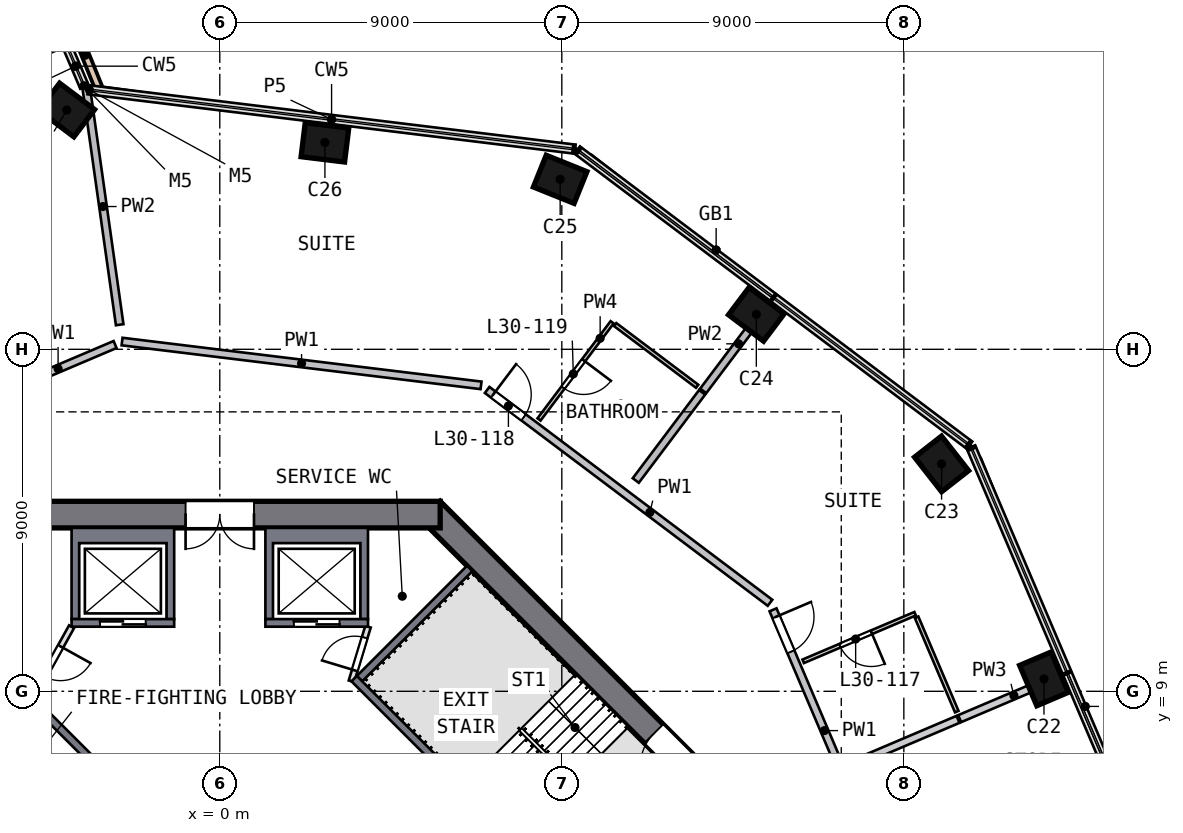
"""IFC4 building model, lengths in metres.
Left out: names, types, materials, properties, quantities, classifications, styles, units other than length and angle.
Written with IfcOpenShell. Run it as: python <this file> out.ifc"""

import sys

from ifc_helpers import new_model, si_unit, direction, frame, frame_2d, origin, origin_2d, place, context, subcontext, project, spatial, polyline, rectangle, outline, extrude, element, fill, save


model = new_model("IFC4")
c1 = context("Model", 3, precision=1e-05, world=origin(), true_north=direction((0.0, 1.0)))
c2 = subcontext(c1, "Body", "Model", "MODEL_VIEW")
j1 = project(units=[si_unit("LENGTHUNIT", "METRE"), si_unit("PLANEANGLEUNIT", "RADIAN")], contexts=[c1])
p1 = place(None, origin())
s1 = spatial("IfcSite", under=j1, at=p1, CompositionType="ELEMENT")
p2 = place(p1, origin())
s2 = spatial("IfcBuilding", under=s1, at=p2, CompositionType="ELEMENT")
p3 = place(p2, frame((0.0, 0.0, 128.0)))
s3 = spatial("IfcBuildingStorey", under=s2, at=p3, CompositionType="ELEMENT", Elevation=128.0)
p4 = place(p3, frame((21.725, 9.24, 0.0), z_axis=(-0.031447894, 0.07228864, 0.996887849), x_axis=(-0.389957088, 0.91745261, -0.078830061)))
e1 = element("IfcColumn", 1, at=p4, inside=s3, PredefinedType="COLUMN", context=c2, shape_type="SweptSolid", body=[
    extrude(rectangle(XDim=1.15, YDim=0.9, at=origin_2d()), origin(), (0.0, 0.0, 1.0), 4.705),
])
p5 = place(p3, frame((19.054, 14.908, 0.0), z_axis=(-0.050329312, 0.063248898, 0.996727915), x_axis=(0.614021089, -0.785140179, 0.080826983)))
e2 = element("IfcColumn", 2, at=p5, inside=s3, PredefinedType="COLUMN", context=c2, shape_type="SweptSolid", body=[
    extrude(rectangle(XDim=1.15, YDim=0.9, at=origin_2d()), origin(), (0.0, 0.0, 1.0), 4.705),
])
p6 = place(p3, frame((14.195, 18.865, 0.0), z_axis=(-0.063414643, 0.046860412, 0.996886495), x_axis=(-0.796717911, 0.599185859, -0.078847169)))
e3 = element("IfcColumn", 3, at=p6, inside=s3, PredefinedType="COLUMN", context=c2, shape_type="SweptSolid", body=[
    extrude(rectangle(XDim=1.15, YDim=0.9, at=origin_2d()), origin(), (0.0, 0.0, 1.0), 4.705),
])
p7 = place(p3, frame((9.047, 22.438, 0.0), z_axis=(-0.075182891, 0.02957505, 0.996731082), x_axis=(0.924435727, -0.372682031, 0.08078793)))
e4 = element("IfcColumn", 4, at=p7, inside=s3, PredefinedType="COLUMN", context=c2, shape_type="SweptSolid", body=[
    extrude(rectangle(XDim=1.15, YDim=0.9, at=origin_2d()), origin(), (0.0, 0.0, 1.0), 4.705),
])
p8 = place(p3, frame((2.861, 23.434, 0.0), z_axis=(-0.078360052, 0.008925781, 0.996885165), x_axis=(-0.989494135, 0.121168594, -0.078863985)))
e5 = element("IfcColumn", 5, at=p8, inside=s3, PredefinedType="COLUMN", context=c2, shape_type="SweptSolid", body=[
    extrude(rectangle(XDim=1.15, YDim=0.9, at=origin_2d()), origin(), (0.0, 0.0, 1.0), 4.705),
])
p9 = place(p3, frame((-3.929, 24.314, 0.0), z_axis=(-0.081088163, -0.013800033, 0.996611393), x_axis=(0.795731126, -0.603018835, 0.056393792)))
e6 = element("IfcColumn", 6, at=p9, inside=s3, PredefinedType="COLUMN", context=c2, shape_type="SweptSolid", body=[
    extrude(rectangle(XDim=1.15, YDim=0.9, at=origin_2d()), origin(), (0.0, 0.0, 1.0), 4.706),
])
p10 = place(p3, frame((13.752, 5.552, 0.0), z_axis=(0.0, 0.0, 1.0), x_axis=(-0.707106781, 0.707106781, 0.0)))
e7 = element("IfcWall", 7, at=p10, inside=s3, PredefinedType="SHEAR", context=c2, shape_type="SweptSolid", body=[
    extrude(rectangle(XDim=11.598, YDim=0.7, at=frame_2d((5.799, 0.0))), origin(), (0.0, 0.0, 1.0), 5.0),
])
p11 = place(p10, frame((2.099, 0.0, 0.0)))
e8 = element("IfcOpeningElement", 8, at=p11, cuts=e7, PredefinedType="OPENING", context=c2, shape_type="SweptSolid", body=[
    extrude(rectangle(XDim=1.2, YDim=2.1, at=frame_2d((0.6, 1.05))), frame((0.0, 0.36, 0.0), z_axis=(0.0, -1.0, 0.0), x_axis=(1.0, 0.0, 0.0)), (0.0, 0.0, 1.0), 0.72),
])
p12 = place(p3, frame((5.799, 13.65, 0.0), z_axis=(0.0, 0.0, 1.0), x_axis=(-1.0, 0.0, 0.0)))
e9 = element("IfcWall", 9, at=p12, inside=s3, PredefinedType="SHEAR", context=c2, shape_type="SweptSolid", body=[
    extrude(rectangle(XDim=11.598, YDim=0.7, at=frame_2d((5.799, 0.0))), origin(), (0.0, 0.0, 1.0), 5.0),
])
p13 = place(p12, frame((4.899, 0.0, 0.0)))
e10 = element("IfcOpeningElement", 10, at=p13, cuts=e9, PredefinedType="OPENING", context=c2, shape_type="SweptSolid", body=[
    extrude(rectangle(XDim=1.8, YDim=2.1, at=frame_2d((0.9, 1.05))), frame((0.0, 0.36, 0.0), z_axis=(0.0, -1.0, 0.0), x_axis=(1.0, 0.0, 0.0)), (0.0, 0.0, 1.0), 0.72),
])
p14 = place(p3, frame((-4.028, 26.079, 0.0), z_axis=(0.0, 0.0, 1.0), x_axis=(-0.920232466, -0.391372212, 0.0)))
e11 = element("IfcWall", 11, at=p14, inside=s3, PredefinedType="SOLIDWALL", context=c2, shape_type="SweptSolid", body=[
    extrude(rectangle(XDim=1.875, YDim=0.15, at=frame_2d((0.938, 0.0))), origin(), (0.0, 0.0, 1.0), 4.69),
])
p15 = place(p3, frame((-3.169, 24.839, 0.0), z_axis=(0.0, 0.0, 1.0), x_axis=(-0.375976177, 0.926629329, 0.0)))
e12 = element("IfcWall", 12, at=p15, inside=s3, PredefinedType="PARAPET", context=c2, shape_type="SweptSolid", body=[
    extrude(rectangle(XDim=1.944, YDim=0.2, at=frame_2d((0.972, 0.0))), origin(), (0.0, 0.0, 1.0), 1.1),
])
p16 = place(p3, frame((-3.955, 26.51, 0.0), z_axis=(0.0, 0.0, 1.0), x_axis=(-0.926634415, -0.375963642, 0.0)))
e13 = element("IfcWall", 13, at=p16, inside=s3, PredefinedType="PARAPET", context=c2, shape_type="SweptSolid", body=[
    extrude(rectangle(XDim=1.6, YDim=0.2, at=frame_2d((0.8, 0.0))), origin(), (0.0, 0.0, 1.0), 1.1),
])
p17 = place(p3, origin())
e14 = element("IfcWall", 14, at=p17, inside=s3, PredefinedType="SOLIDWALL", context=c2, shape_type="SweptSolid", body=[
    extrude(outline(polyline([(3.9, 13.3), (3.9, 10.9), (3.7, 10.9), (3.7, 12.9), (1.4, 12.9), (1.4, 10.9), (1.2, 10.9), (1.2, 13.3), (3.9, 13.3)])), origin(), (0.0, 0.0, 1.0), 4.69),
])
p18 = place(p3, frame((1.2, 10.8, 0.0), z_axis=(0.0, 0.0, 1.0), x_axis=(1.0, 0.0, 0.0)))
e15 = element("IfcWall", 15, at=p18, inside=s3, PredefinedType="SOLIDWALL", context=c2, shape_type="SweptSolid", body=[
    extrude(rectangle(XDim=2.7, YDim=0.2, at=frame_2d((1.35, 0.0))), origin(), (0.0, 0.0, 1.0), 4.69),
])
p19 = place(p18, frame((0.75, 0.0, 0.0)))
e16 = element("IfcOpeningElement", 16, at=p19, cuts=e15, PredefinedType="OPENING", context=c2, shape_type="SweptSolid", body=[
    extrude(rectangle(XDim=1.2, YDim=2.1, at=frame_2d((0.6, 1.05))), frame((0.0, 0.11, 0.0), z_axis=(0.0, -1.0, 0.0), x_axis=(1.0, 0.0, 0.0)), (0.0, 0.0, 1.0), 0.22),
])
p20 = place(p3, origin())
e17 = element("IfcWall", 17, at=p20, inside=s3, PredefinedType="SOLIDWALL", context=c2, shape_type="SweptSolid", body=[
    extrude(outline(polyline([(-3.9, 10.9), (-3.9, 13.3), (-1.2, 13.3), (-1.2, 10.9), (-1.4, 10.9), (-1.4, 12.9), (-3.7, 12.9), (-3.7, 10.9), (-3.9, 10.9)])), origin(), (0.0, 0.0, 1.0), 4.69),
])
p21 = place(p3, frame((-1.2, 10.8, 0.0), z_axis=(0.0, 0.0, 1.0), x_axis=(-1.0, 0.0, 0.0)))
e18 = element("IfcWall", 18, at=p21, inside=s3, PredefinedType="SOLIDWALL", context=c2, shape_type="SweptSolid", body=[
    extrude(rectangle(XDim=2.7, YDim=0.2, at=frame_2d((1.35, 0.0))), origin(), (0.0, 0.0, 1.0), 4.69),
])
p22 = place(p21, frame((0.75, 0.0, 0.0)))
e19 = element("IfcOpeningElement", 19, at=p22, cuts=e18, PredefinedType="OPENING", context=c2, shape_type="SweptSolid", body=[
    extrude(rectangle(XDim=1.2, YDim=2.1, at=frame_2d((0.6, 1.05))), frame((0.0, 0.11, 0.0), z_axis=(0.0, -1.0, 0.0), x_axis=(1.0, 0.0, 0.0)), (0.0, 0.0, 1.0), 0.22),
])
p23 = place(p3, frame((3.535, 9.334, 0.0), z_axis=(0.0, 0.0, 1.0), x_axis=(0.707106781, -0.707106781, 0.0)))
e20 = element("IfcWall", 20, at=p23, inside=s3, PredefinedType="SOLIDWALL", context=c2, shape_type="SweptSolid", body=[
    extrude(rectangle(XDim=8.2, YDim=0.2, at=frame_2d((4.1, 0.0))), origin(), (0.0, 0.0, 1.0), 4.69),
])
p24 = place(p23, frame((6.6, 0.0, 0.0)))
e21 = element("IfcOpeningElement", 21, at=p24, cuts=e20, PredefinedType="OPENING", context=c2, shape_type="SweptSolid", body=[
    extrude(rectangle(XDim=1.2, YDim=2.1, at=frame_2d((0.6, 1.05))), frame((0.0, 0.11, 0.0), z_axis=(0.0, -1.0, 0.0), x_axis=(1.0, 0.0, 0.0)), (0.0, 0.0, 1.0), 0.22),
])
p25 = place(p3, frame((3.677, 9.334, 0.0), z_axis=(0.0, 0.0, 1.0), x_axis=(0.707106781, 0.707106781, 0.0)))
e22 = element("IfcWall", 22, at=p25, inside=s3, PredefinedType="SOLIDWALL", context=c2, shape_type="SweptSolid", body=[
    extrude(rectangle(XDim=4.1, YDim=0.2, at=frame_2d((2.05, 0.0))), origin(), (0.0, 0.0, 1.0), 4.69),
])
p26 = place(p3, frame((-3.005, 6.823, 0.0), z_axis=(0.0, 0.0, 1.0), x_axis=(-0.707106781, 0.707106781, 0.0)))
e23 = element("IfcWall", 23, at=p26, inside=s3, PredefinedType="SOLIDWALL", context=c2, shape_type="SweptSolid", body=[
    extrude(rectangle(XDim=2.8, YDim=0.2, at=frame_2d((1.4, 0.0))), origin(), (0.0, 0.0, 1.0), 4.69),
])
p27 = place(p3, frame((3.465, 9.263, 0.0), z_axis=(0.0, 0.0, 1.0), x_axis=(0.289808785, 0.957084567, 0.0)))
e24 = element("IfcWall", 24, at=p27, inside=s3, PredefinedType="PARTITIONING", context=c2, shape_type="SweptSolid", body=[
    extrude(rectangle(XDim=1.501, YDim=0.15, at=frame_2d((0.75, 0.0))), origin(), (0.0, 0.0, 1.0), 4.69),
])
p28 = place(p27, frame((0.301, 0.0, 0.0)))
e25 = element("IfcOpeningElement", 25, at=p28, cuts=e24, PredefinedType="OPENING", context=c2, shape_type="SweptSolid", body=[
    extrude(rectangle(XDim=0.9, YDim=2.1, at=frame_2d((0.45, 1.05))), frame((0.0, 0.085, 0.0), z_axis=(0.0, -1.0, 0.0), x_axis=(1.0, 0.0, 0.0)), (0.0, 0.0, 1.0), 0.17),
])
p29 = place(p3, frame((-3.9, 10.7, 0.0), z_axis=(0.0, 0.0, 1.0), x_axis=(-0.485692555, -0.874129705, 0.0)))
e26 = element("IfcWall", 26, at=p29, inside=s3, PredefinedType="PARTITIONING", context=c2, shape_type="SweptSolid", body=[
    extrude(rectangle(XDim=2.089, YDim=0.15, at=frame_2d((1.044, 0.0))), origin(), (0.0, 0.0, 1.0), 4.69),
])
p30 = place(p29, frame((0.594, 0.0, 0.0)))
e27 = element("IfcOpeningElement", 27, at=p30, cuts=e26, PredefinedType="OPENING", context=c2, shape_type="SweptSolid", body=[
    extrude(rectangle(XDim=0.9, YDim=2.1, at=frame_2d((0.45, 1.05))), frame((0.0, 0.085, 0.0), z_axis=(0.0, -1.0, 0.0), x_axis=(1.0, 0.0, 0.0)), (0.0, 0.0, 1.0), 0.17),
])
p31 = place(p3, frame((-2.756, 18.126, 0.0), z_axis=(0.0, 0.0, 1.0), x_axis=(-0.920234459, -0.391367525, 0.0)))
e28 = element("IfcWall", 28, at=p31, inside=s3, PredefinedType="SOLIDWALL", context=c2, shape_type="SweptSolid", body=[
    extrude(rectangle(XDim=3.258, YDim=0.2, at=frame_2d((1.629, 0.0))), origin(), (0.0, 0.0, 1.0), 4.69),
])
p32 = place(p3, frame((6.875, 17.051, 0.0), z_axis=(0.0, 0.0, 1.0), x_axis=(-0.992628272, 0.121198655, 0.0)))
e29 = element("IfcWall", 29, at=p32, inside=s3, PredefinedType="SOLIDWALL", context=c2, shape_type="SweptSolid", body=[
    extrude(rectangle(XDim=9.516, YDim=0.2, at=frame_2d((4.758, 0.0))), origin(), (0.0, 0.0, 1.0), 4.69),
])
p33 = place(p3, frame((7.035, 16.93, 0.0), z_axis=(0.0, 0.0, 1.0), x_axis=(0.799039784, -0.601278158, 0.0)))
e30 = element("IfcWall", 30, at=p33, inside=s3, PredefinedType="SOLIDWALL", context=c2, shape_type="SweptSolid", body=[
    extrude(rectangle(XDim=9.316, YDim=0.2, at=frame_2d((4.658, 0.0))), origin(), (0.0, 0.0, 1.0), 4.69),
])
p34 = place(p33, frame((0.2, 0.0, 0.0)))
e31 = element("IfcOpeningElement", 31, at=p34, cuts=e30, PredefinedType="OPENING", context=c2, shape_type="SweptSolid", body=[
    extrude(rectangle(XDim=1.0, YDim=2.1, at=frame_2d((0.5, 1.05))), frame((0.0, 0.11, 0.0), z_axis=(0.0, -1.0, 0.0), x_axis=(1.0, 0.0, 0.0)), (0.0, 0.0, 1.0), 0.22),
])
p35 = place(p3, frame((14.558, 11.144, 0.0), z_axis=(0.0, 0.0, 1.0), x_axis=(0.39135783, -0.920238582, 0.0)))
e32 = element("IfcWall", 32, at=p35, inside=s3, PredefinedType="SOLIDWALL", context=c2, shape_type="SweptSolid", body=[
    extrude(rectangle(XDim=9.116, YDim=0.2, at=frame_2d((4.558, 0.0))), origin(), (0.0, 0.0, 1.0), 4.69),
])
p36 = place(p35, frame((0.2, 0.0, 0.0)))
e33 = element("IfcOpeningElement", 33, at=p36, cuts=e32, PredefinedType="OPENING", context=c2, shape_type="SweptSolid", body=[
    extrude(rectangle(XDim=1.0, YDim=2.1, at=frame_2d((0.5, 1.05))), frame((0.0, 0.11, 0.0), z_axis=(0.0, -1.0, 0.0), x_axis=(1.0, 0.0, 0.0)), (0.0, 0.0, 1.0), 0.22),
])
p37 = place(p35, frame((8.008, 0.0, 0.0)))
e34 = element("IfcOpeningElement", 34, at=p37, cuts=e32, PredefinedType="OPENING", context=c2, shape_type="SweptSolid", body=[
    extrude(rectangle(XDim=0.9, YDim=2.1, at=frame_2d((0.45, 1.05))), frame((0.0, 0.11, 0.0), z_axis=(0.0, -1.0, 0.0), x_axis=(1.0, 0.0, 0.0)), (0.0, 0.0, 1.0), 0.22),
])
p38 = place(p35, frame((5.708, 0.0, 0.0)))
e35 = element("IfcOpeningElement", 35, at=p38, cuts=e32, PredefinedType="OPENING", context=c2, shape_type="SweptSolid", body=[
    extrude(rectangle(XDim=0.9, YDim=2.1, at=frame_2d((0.45, 1.05))), frame((0.0, 0.11, 0.0), z_axis=(0.0, -1.0, 0.0), x_axis=(1.0, 0.0, 0.0)), (0.0, 0.0, 1.0), 0.22),
])
p39 = place(p3, frame((-3.513, 24.867, 0.0), z_axis=(0.0, 0.0, 1.0), x_axis=(0.139908623, -0.990164419, 0.0)))
e36 = element("IfcWall", 36, at=p39, inside=s3, PredefinedType="SOLIDWALL", context=c2, shape_type="SweptSolid", body=[
    extrude(rectangle(XDim=6.282, YDim=0.2, at=frame_2d((3.141, 0.0))), origin(), (0.0, 0.0, 1.0), 4.69),
])
p40 = place(p3, frame((10.946, 14.547, 0.0), z_axis=(0.0, 0.0, 1.0), x_axis=(0.601223093, 0.799081217, 0.0)))
e37 = element("IfcWall", 37, at=p40, inside=s3, PredefinedType="SOLIDWALL", context=c2, shape_type="SweptSolid", body=[
    extrude(rectangle(XDim=2.905, YDim=0.2, at=frame_2d((1.452, 0.0))), origin(), (0.0, 0.0, 1.0), 4.69),
])
p41 = place(p3, frame((12.72, 16.905, 0.0), z_axis=(0.0, 0.0, 1.0), x_axis=(0.601220789, 0.799082951, 0.0)))
e38 = element("IfcWall", 38, at=p41, inside=s3, PredefinedType="SOLIDWALL", context=c2, shape_type="SweptSolid", body=[
    extrude(rectangle(XDim=3.102, YDim=0.2, at=frame_2d((1.551, 0.0))), origin(), (0.0, 0.0, 1.0), 4.69),
])
p42 = place(p3, frame((10.324, 18.71, 0.0), z_axis=(0.0, 0.0, 1.0), x_axis=(-0.601280986, -0.799037656, 0.0)))
e39 = element("IfcWall", 39, at=p42, inside=s3, PredefinedType="PARTITIONING", context=c2, shape_type="SweptSolid", body=[
    extrude(rectangle(XDim=3.2, YDim=0.1, at=frame_2d((1.6, 0.0))), origin(), (0.0, 0.0, 1.0), 4.69),
])
p43 = place(p42, frame((1.25, 0.0, 0.0)))
e40 = element("IfcOpeningElement", 40, at=p43, cuts=e39, PredefinedType="OPENING", context=c2, shape_type="SweptSolid", body=[
    extrude(rectangle(XDim=0.9, YDim=2.1, at=frame_2d((0.45, 1.05))), frame((0.0, 0.06, 0.0), z_axis=(0.0, -1.0, 0.0), x_axis=(1.0, 0.0, 0.0)), (0.0, 0.0, 1.0), 0.12),
])
p44 = place(p3, frame((10.404, 18.65, 0.0), z_axis=(0.0, 0.0, 1.0), x_axis=(0.799033288, -0.60128679, 0.0)))
e41 = element("IfcWall", 41, at=p44, inside=s3, PredefinedType="PARTITIONING", context=c2, shape_type="SweptSolid", body=[
    extrude(rectangle(XDim=2.7, YDim=0.1, at=frame_2d((1.35, 0.0))), origin(), (0.0, 0.0, 1.0), 4.69),
])
p45 = place(p3, frame((18.296, 11.042, 0.0), z_axis=(0.0, 0.0, 1.0), x_axis=(-0.92021896, -0.391403968, 0.0)))
e42 = element("IfcWall", 42, at=p45, inside=s3, PredefinedType="PARTITIONING", context=c2, shape_type="SweptSolid", body=[
    extrude(rectangle(XDim=3.2, YDim=0.1, at=frame_2d((1.6, 0.0))), origin(), (0.0, 0.0, 1.0), 4.69),
])
p46 = place(p45, frame((1.25, 0.0, 0.0)))
e43 = element("IfcOpeningElement", 43, at=p46, cuts=e42, PredefinedType="OPENING", context=c2, shape_type="SweptSolid", body=[
    extrude(rectangle(XDim=0.9, YDim=2.1, at=frame_2d((0.45, 1.05))), frame((0.0, 0.06, 0.0), z_axis=(0.0, -1.0, 0.0), x_axis=(1.0, 0.0, 0.0)), (0.0, 0.0, 1.0), 0.12),
])
p47 = place(p3, frame((18.336, 10.949, 0.0), z_axis=(0.0, 0.0, 1.0), x_axis=(0.391353166, -0.920240566, 0.0)))
e44 = element("IfcWall", 44, at=p47, inside=s3, PredefinedType="PARTITIONING", context=c2, shape_type="SweptSolid", body=[
    extrude(rectangle(XDim=2.7, YDim=0.1, at=frame_2d((1.35, 0.0))), origin(), (0.0, 0.0, 1.0), 4.69),
])
p48 = place(p3, frame((16.753, 7.125, 0.0), z_axis=(0.0, 0.0, 1.0), x_axis=(0.920249965, 0.391331065, 0.0)))
e45 = element("IfcWall", 45, at=p48, inside=s3, PredefinedType="SOLIDWALL", context=c2, shape_type="SweptSolid", body=[
    extrude(rectangle(XDim=2.905, YDim=0.2, at=frame_2d((1.452, 0.0))), origin(), (0.0, 0.0, 1.0), 4.69),
])
p49 = place(p3, frame((19.469, 8.28, 0.0), z_axis=(0.0, 0.0, 1.0), x_axis=(0.920220386, 0.391400614, 0.0)))
e46 = element("IfcWall", 46, at=p49, inside=s3, PredefinedType="SOLIDWALL", context=c2, shape_type="SweptSolid", body=[
    extrude(rectangle(XDim=3.102, YDim=0.2, at=frame_2d((1.551, 0.0))), origin(), (0.0, 0.0, 1.0), 4.69),
])
p50 = place(p19, origin())
e47 = element("IfcDoor", 47, at=p50, inside=s3, OperationType="DOUBLE_DOOR_SLIDING", PredefinedType="DOOR", context=c2, shape_type="SweptSolid", body=[
    extrude(rectangle(XDim=1.2, YDim=2.1, at=frame_2d((0.6, 1.05))), frame((0.0, 0.025, 0.0), z_axis=(0.0, -1.0, 0.0), x_axis=(1.0, 0.0, 0.0)), (0.0, 0.0, 1.0), 0.05),
])
fill(e16, e47)
p51 = place(p22, origin())
e48 = element("IfcDoor", 48, at=p51, inside=s3, OperationType="DOUBLE_DOOR_SLIDING", PredefinedType="DOOR", context=c2, shape_type="SweptSolid", body=[
    extrude(rectangle(XDim=1.2, YDim=2.1, at=frame_2d((0.6, 1.05))), frame((0.0, 0.025, 0.0), z_axis=(0.0, -1.0, 0.0), x_axis=(1.0, 0.0, 0.0)), (0.0, 0.0, 1.0), 0.05),
])
fill(e19, e48)
p52 = place(p13, origin())
e49 = element("IfcDoor", 49, at=p52, inside=s3, OperationType="DOUBLE_DOOR_SINGLE_SWING", PredefinedType="DOOR", context=c2, shape_type="SweptSolid", body=[
    extrude(rectangle(XDim=1.8, YDim=2.1, at=frame_2d((0.9, 1.05))), frame((0.0, 0.025, 0.0), z_axis=(0.0, -1.0, 0.0), x_axis=(1.0, 0.0, 0.0)), (0.0, 0.0, 1.0), 0.05),
])
fill(e10, e49)
p53 = place(p11, origin())
e50 = element("IfcDoor", 50, at=p53, inside=s3, OperationType="SINGLE_SWING_LEFT", PredefinedType="DOOR", context=c2, shape_type="SweptSolid", body=[
    extrude(rectangle(XDim=1.2, YDim=2.1, at=frame_2d((0.6, 1.05))), frame((0.0, 0.025, 0.0), z_axis=(0.0, -1.0, 0.0), x_axis=(1.0, 0.0, 0.0)), (0.0, 0.0, 1.0), 0.05),
])
fill(e8, e50)
p54 = place(p28, origin())
e51 = element("IfcDoor", 51, at=p54, inside=s3, OperationType="SINGLE_SWING_LEFT", PredefinedType="DOOR", context=c2, shape_type="SweptSolid", body=[
    extrude(rectangle(XDim=0.9, YDim=2.1, at=frame_2d((0.45, 1.05))), frame((0.0, 0.025, 0.0), z_axis=(0.0, -1.0, 0.0), x_axis=(1.0, 0.0, 0.0)), (0.0, 0.0, 1.0), 0.05),
])
fill(e25, e51)
p55 = place(p30, origin())
e52 = element("IfcDoor", 52, at=p55, inside=s3, OperationType="SINGLE_SWING_LEFT", PredefinedType="DOOR", context=c2, shape_type="SweptSolid", body=[
    extrude(rectangle(XDim=0.9, YDim=2.1, at=frame_2d((0.45, 1.05))), frame((0.0, 0.025, 0.0), z_axis=(0.0, -1.0, 0.0), x_axis=(1.0, 0.0, 0.0)), (0.0, 0.0, 1.0), 0.05),
])
fill(e27, e52)
p56 = place(p36, origin())
e53 = element("IfcDoor", 53, at=p56, inside=s3, OperationType="SINGLE_SWING_LEFT", PredefinedType="DOOR", context=c2, shape_type="SweptSolid", body=[
    extrude(rectangle(XDim=1.0, YDim=2.1, at=frame_2d((0.5, 1.05))), frame((0.0, 0.025, 0.0), z_axis=(0.0, -1.0, 0.0), x_axis=(1.0, 0.0, 0.0)), (0.0, 0.0, 1.0), 0.05),
])
fill(e33, e53)
p57 = place(p46, origin())
e54 = element("IfcDoor", 54, at=p57, inside=s3, OperationType="SINGLE_SWING_LEFT", PredefinedType="DOOR", context=c2, shape_type="SweptSolid", body=[
    extrude(rectangle(XDim=0.9, YDim=2.1, at=frame_2d((0.45, 1.05))), frame((0.0, 0.025, 0.0), z_axis=(0.0, -1.0, 0.0), x_axis=(1.0, 0.0, 0.0)), (0.0, 0.0, 1.0), 0.05),
])
fill(e43, e54)
p58 = place(p34, origin())
e55 = element("IfcDoor", 55, at=p58, inside=s3, OperationType="SINGLE_SWING_LEFT", PredefinedType="DOOR", context=c2, shape_type="SweptSolid", body=[
    extrude(rectangle(XDim=1.0, YDim=2.1, at=frame_2d((0.5, 1.05))), frame((0.0, 0.025, 0.0), z_axis=(0.0, -1.0, 0.0), x_axis=(1.0, 0.0, 0.0)), (0.0, 0.0, 1.0), 0.05),
])
fill(e31, e55)
p59 = place(p43, origin())
e56 = element("IfcDoor", 56, at=p59, inside=s3, OperationType="SINGLE_SWING_LEFT", PredefinedType="DOOR", context=c2, shape_type="SweptSolid", body=[
    extrude(rectangle(XDim=0.9, YDim=2.1, at=frame_2d((0.45, 1.05))), frame((0.0, 0.025, 0.0), z_axis=(0.0, -1.0, 0.0), x_axis=(1.0, 0.0, 0.0)), (0.0, 0.0, 1.0), 0.05),
])
fill(e40, e56)
save(model, sys.argv[1])
